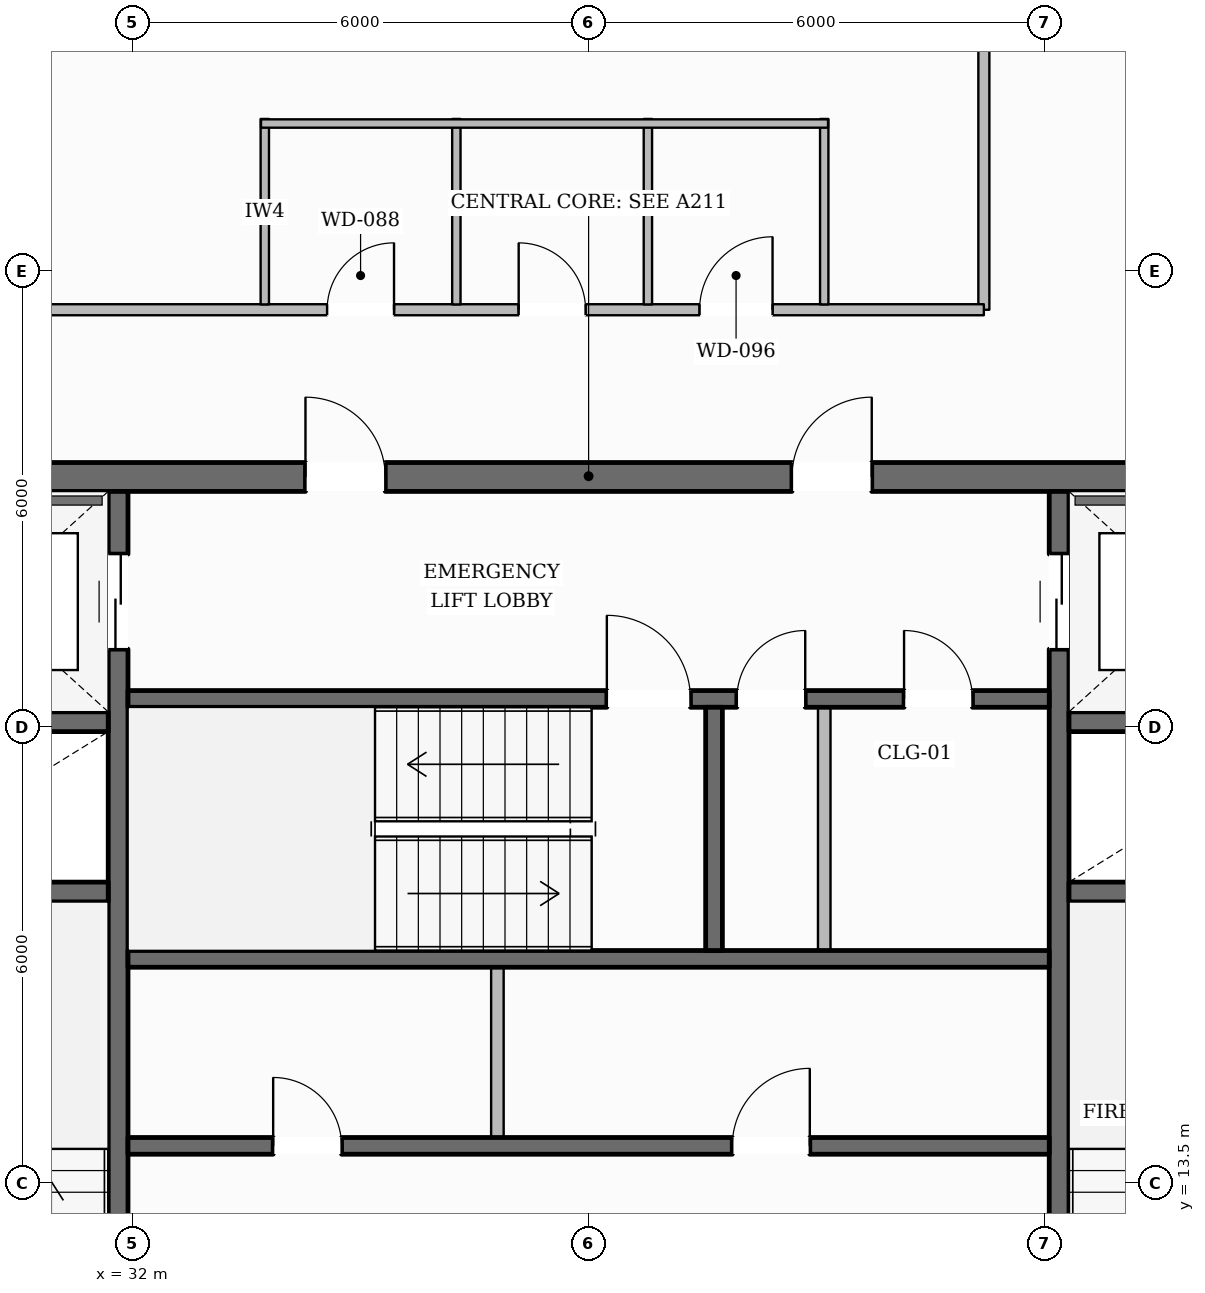
"""IFC4 building model, lengths in metres.
Left out: names, types, materials, properties, quantities, classifications, styles, units other than length and angle.
Written with IfcOpenShell. Run it as: python <this file> out.ifc"""

import sys

from ifc_helpers import new_model, si_unit, direction, frame, frame_2d, origin, place, context, subcontext, project, spatial, rectangle, extrude, element, fill, save


model = new_model("IFC4")
c1 = context("Model", 3, precision=1e-05, world=origin(), true_north=direction((0.0, 1.0)))
c2 = subcontext(c1, "Body", "Model", "MODEL_VIEW")
j1 = project(units=[si_unit("LENGTHUNIT", "METRE"), si_unit("PLANEANGLEUNIT", "RADIAN")], contexts=[c1])
p1 = place(None, origin())
s1 = spatial("IfcSite", under=j1, at=p1, CompositionType="ELEMENT")
p2 = place(p1, origin())
s2 = spatial("IfcBuilding", under=s1, at=p2, CompositionType="ELEMENT")
p3 = place(p2, frame((0.0, 0.0, 239.5)))
s3 = spatial("IfcBuildingStorey", under=s2, at=p3, CompositionType="ELEMENT", Elevation=239.5)
p4 = place(p3, frame((28.1, 22.79, 0.0), z_axis=(0.0, 0.0, 1.0), x_axis=(1.0, 0.0, 0.0)))
e1 = element("IfcWall", 1, at=p4, inside=s3, PredefinedType="SOLIDWALL", context=c2, shape_type="SweptSolid", body=[
    extrude(rectangle(XDim=19.8, YDim=0.38, at=frame_2d((9.9, 0.0))), origin(), (0.0, 0.0, 1.0), 3.61),
])
p5 = place(p4, frame((6.175, 0.0, 0.0)))
e2 = element("IfcOpeningElement", 2, at=p5, cuts=e1, PredefinedType="OPENING", context=c2, shape_type="SweptSolid", body=[
    extrude(rectangle(XDim=1.05, YDim=2.15, at=frame_2d((0.525, 1.075))), frame((0.0, 0.2, 0.0), z_axis=(0.0, -1.0, 0.0), x_axis=(1.0, 0.0, 0.0)), (0.0, 0.0, 1.0), 0.4),
])
p6 = place(p4, frame((12.575, 0.0, 0.0)))
e3 = element("IfcOpeningElement", 3, at=p6, cuts=e1, PredefinedType="OPENING", context=c2, shape_type="SweptSolid", body=[
    extrude(rectangle(XDim=1.05, YDim=2.15, at=frame_2d((0.525, 1.075))), frame((0.0, 0.2, 0.0), z_axis=(0.0, -1.0, 0.0), x_axis=(1.0, 0.0, 0.0)), (0.0, 0.0, 1.0), 0.4),
])
p7 = place(p3, frame((31.81, 9.6, 0.0), z_axis=(0.0, 0.0, 1.0), x_axis=(0.0, 1.0, 0.0)))
e4 = element("IfcWall", 4, at=p7, inside=s3, PredefinedType="SHEAR", context=c2, shape_type="SweptSolid", body=[
    extrude(rectangle(XDim=13.0, YDim=0.26, at=frame_2d((6.5, 0.0))), origin(), (0.0, 0.0, 1.0), 3.61),
])
p8 = place(p7, frame((10.925, 0.0, 0.0)))
e5 = element("IfcOpeningElement", 5, at=p8, cuts=e4, PredefinedType="OPENING", context=c2, shape_type="SweptSolid", body=[
    extrude(rectangle(XDim=1.25, YDim=2.25, at=frame_2d((0.625, 1.125))), frame((0.0, 0.14, 0.0), z_axis=(0.0, -1.0, 0.0), x_axis=(1.0, 0.0, 0.0)), (0.0, 0.0, 1.0), 0.28),
])
p9 = place(p3, frame((44.19, 9.6, 0.0), z_axis=(0.0, 0.0, 1.0), x_axis=(0.0, 1.0, 0.0)))
e6 = element("IfcWall", 6, at=p9, inside=s3, PredefinedType="SHEAR", context=c2, shape_type="SweptSolid", body=[
    extrude(rectangle(XDim=13.0, YDim=0.26, at=frame_2d((6.5, 0.0))), origin(), (0.0, 0.0, 1.0), 3.61),
])
p10 = place(p9, frame((10.925, 0.0, 0.0)))
e7 = element("IfcOpeningElement", 7, at=p10, cuts=e6, PredefinedType="OPENING", context=c2, shape_type="SweptSolid", body=[
    extrude(rectangle(XDim=1.25, YDim=2.25, at=frame_2d((0.625, 1.125))), frame((0.0, 0.14, 0.0), z_axis=(0.0, -1.0, 0.0), x_axis=(1.0, 0.0, 0.0)), (0.0, 0.0, 1.0), 0.28),
])
for number, where, z_axis, x_axis in (
    (8, (28.48, 17.33, 0.0), (0.0, 0.0, 1.0), (1.0, 0.0, 0.0)),
    (9, (28.48, 19.57, 0.0), (0.0, 0.0, 1.0), (1.0, 0.0, 0.0)),
    (10, (44.32, 17.33, 0.0), (0.0, 0.0, 1.0), (1.0, 0.0, 0.0)),
    (11, (44.32, 19.57, 0.0), (0.0, 0.0, 1.0), (1.0, 0.0, 0.0)),
):
    element("IfcWall", number, at=place(p3, frame(where, z_axis=z_axis, x_axis=x_axis)), inside=s3, PredefinedType="SHEAR", context=c2, shape_type="SweptSolid", body=[
        extrude(rectangle(XDim=3.2, YDim=0.26, at=frame_2d((1.6, 0.0))), origin(), (0.0, 0.0, 1.0), 3.61),
    ])
p11 = place(p3, frame((31.94, 19.87, 0.0), z_axis=(0.0, 0.0, 1.0), x_axis=(1.0, 0.0, 0.0)))
e12 = element("IfcWall", 12, at=p11, inside=s3, PredefinedType="SOLIDWALL", context=c2, shape_type="SweptSolid", body=[
    extrude(rectangle(XDim=12.12, YDim=0.22, at=frame_2d((6.06, 0.0))), origin(), (0.0, 0.0, 1.0), 3.61),
])
p12 = place(p11, frame((6.3, 0.0, 0.0)))
e13 = element("IfcOpeningElement", 13, at=p12, cuts=e12, PredefinedType="OPENING", context=c2, shape_type="SweptSolid", body=[
    extrude(rectangle(XDim=1.1, YDim=2.15, at=frame_2d((0.55, 1.075))), frame((0.0, 0.12, 0.0), z_axis=(0.0, -1.0, 0.0), x_axis=(1.0, 0.0, 0.0)), (0.0, 0.0, 1.0), 0.24),
])
p13 = place(p11, frame((8.01, 0.0, 0.0)))
e14 = element("IfcOpeningElement", 14, at=p13, cuts=e12, PredefinedType="OPENING", context=c2, shape_type="SweptSolid", body=[
    extrude(rectangle(XDim=0.9, YDim=2.1, at=frame_2d((0.45, 1.05))), frame((0.0, 0.12, 0.0), z_axis=(0.0, -1.0, 0.0), x_axis=(1.0, 0.0, 0.0)), (0.0, 0.0, 1.0), 0.24),
])
p14 = place(p11, frame((10.21, 0.0, 0.0)))
e15 = element("IfcOpeningElement", 15, at=p14, cuts=e12, PredefinedType="OPENING", context=c2, shape_type="SweptSolid", body=[
    extrude(rectangle(XDim=0.9, YDim=2.1, at=frame_2d((0.45, 1.05))), frame((0.0, 0.12, 0.0), z_axis=(0.0, -1.0, 0.0), x_axis=(1.0, 0.0, 0.0)), (0.0, 0.0, 1.0), 0.24),
])
p15 = place(p3, frame((31.94, 16.45, 0.0), z_axis=(0.0, 0.0, 1.0), x_axis=(1.0, 0.0, 0.0)))
e16 = element("IfcWall", 16, at=p15, inside=s3, PredefinedType="SOLIDWALL", context=c2, shape_type="SweptSolid", body=[
    extrude(rectangle(XDim=12.12, YDim=0.22, at=frame_2d((6.06, 0.0))), origin(), (0.0, 0.0, 1.0), 3.61),
])
p16 = place(p3, frame((39.65, 16.56, 0.0), z_axis=(0.0, 0.0, 1.0), x_axis=(0.0, 1.0, 0.0)))
e17 = element("IfcWall", 17, at=p16, inside=s3, PredefinedType="SOLIDWALL", context=c2, shape_type="SweptSolid", body=[
    extrude(rectangle(XDim=3.2, YDim=0.22, at=frame_2d((1.6, 0.0))), origin(), (0.0, 0.0, 1.0), 3.61),
])
p17 = place(p3, frame((31.94, 13.99, 0.0), z_axis=(0.0, 0.0, 1.0), x_axis=(1.0, 0.0, 0.0)))
e18 = element("IfcWall", 18, at=p17, inside=s3, PredefinedType="SOLIDWALL", context=c2, shape_type="SweptSolid", body=[
    extrude(rectangle(XDim=12.12, YDim=0.22, at=frame_2d((6.06, 0.0))), origin(), (0.0, 0.0, 1.0), 3.61),
])
p18 = place(p17, frame((1.91, 0.0, 0.0)))
e19 = element("IfcOpeningElement", 19, at=p18, cuts=e18, PredefinedType="OPENING", context=c2, shape_type="SweptSolid", body=[
    extrude(rectangle(XDim=0.9, YDim=2.1, at=frame_2d((0.45, 1.05))), frame((0.0, 0.12, 0.0), z_axis=(0.0, -1.0, 0.0), x_axis=(1.0, 0.0, 0.0)), (0.0, 0.0, 1.0), 0.24),
])
p19 = place(p17, frame((7.95, 0.0, 0.0)))
e20 = element("IfcOpeningElement", 20, at=p19, cuts=e18, PredefinedType="OPENING", context=c2, shape_type="SweptSolid", body=[
    extrude(rectangle(XDim=1.02, YDim=2.15, at=frame_2d((0.51, 1.075))), frame((0.0, 0.12, 0.0), z_axis=(0.0, -1.0, 0.0), x_axis=(1.0, 0.0, 0.0)), (0.0, 0.0, 1.0), 0.24),
])
p20 = place(p3, frame((16.196, 11.427, 0.0), z_axis=(0.0, 0.0, 1.0), x_axis=(0.490622807514, 0.871372056442, 0.0)))
e21 = element("IfcWall", 21, at=p20, inside=s3, PredefinedType="STANDARD", context=c2, shape_type="SweptSolid", body=[
    extrude(rectangle(XDim=37.632, YDim=0.35, at=frame_2d((18.816, 0.0))), origin(), (0.0, 0.0, 1.0), 3.196),
])
p21 = place(p20, frame((27.624, 0.0, 0.0)))
e22 = element("IfcOpeningElement", 22, at=p21, cuts=e21, PredefinedType="OPENING", context=c2, shape_type="SweptSolid", body=[
    extrude(rectangle(XDim=1.0, YDim=2.2, at=frame_2d((0.5, 1.1))), frame((0.0, 0.185, 0.0), z_axis=(0.0, -1.0, 0.0), x_axis=(1.0, 0.0, 0.0)), (0.0, 0.0, 1.0), 0.37),
])
p22 = place(p20, frame((33.418, 0.0, 0.65)))
e23 = element("IfcOpeningElement", 23, at=p22, cuts=e21, PredefinedType="OPENING", context=c2, shape_type="SweptSolid", body=[
    extrude(rectangle(XDim=1.35, YDim=1.75, at=frame_2d((0.675, 0.875))), frame((0.0, 0.185, 0.0), z_axis=(0.0, -1.0, 0.0), x_axis=(1.0, 0.0, 0.0)), (0.0, 0.0, 1.0), 0.37),
])
p23 = place(p20, frame((21.192, 0.0, 0.65)))
e24 = element("IfcOpeningElement", 24, at=p23, cuts=e21, PredefinedType="OPENING", context=c2, shape_type="SweptSolid", body=[
    extrude(rectangle(XDim=1.35, YDim=1.75, at=frame_2d((0.675, 0.875))), frame((0.0, 0.185, 0.0), z_axis=(0.0, -1.0, 0.0), x_axis=(1.0, 0.0, 0.0)), (0.0, 0.0, 1.0), 0.37),
])
p24 = place(p20, frame((8.966, 0.0, 0.65)))
e25 = element("IfcOpeningElement", 25, at=p24, cuts=e21, PredefinedType="OPENING", context=c2, shape_type="SweptSolid", body=[
    extrude(rectangle(XDim=1.35, YDim=1.75, at=frame_2d((0.675, 0.875))), frame((0.0, 0.185, 0.0), z_axis=(0.0, -1.0, 0.0), x_axis=(1.0, 0.0, 0.0)), (0.0, 0.0, 1.0), 0.37),
])
p25 = place(p20, frame((2.853, 0.0, 0.65)))
e26 = element("IfcOpeningElement", 26, at=p25, cuts=e21, PredefinedType="OPENING", context=c2, shape_type="SweptSolid", body=[
    extrude(rectangle(XDim=1.35, YDim=1.75, at=frame_2d((0.675, 0.875))), frame((0.0, 0.185, 0.0), z_axis=(0.0, -1.0, 0.0), x_axis=(1.0, 0.0, 0.0)), (0.0, 0.0, 1.0), 0.37),
])
p26 = place(p3, frame((41.394, 44.187, 0.0), z_axis=(0.0, 0.0, 1.0), x_axis=(0.494287620829, -0.869298422807, 0.0)))
e27 = element("IfcWall", 27, at=p26, inside=s3, PredefinedType="STANDARD", context=c2, shape_type="SweptSolid", body=[
    extrude(rectangle(XDim=37.899, YDim=0.35, at=frame_2d((18.95, 0.0))), origin(), (0.0, 0.0, 1.0), 3.196),
])
p27 = place(p26, frame((33.674, 0.0, 0.65)))
e28 = element("IfcOpeningElement", 28, at=p27, cuts=e27, PredefinedType="OPENING", context=c2, shape_type="SweptSolid", body=[
    extrude(rectangle(XDim=1.35, YDim=1.75, at=frame_2d((0.675, 0.875))), frame((0.0, 0.185, 0.0), z_axis=(0.0, -1.0, 0.0), x_axis=(1.0, 0.0, 0.0)), (0.0, 0.0, 1.0), 0.37),
])
p28 = place(p26, frame((27.515, 0.0, 0.65)))
e29 = element("IfcOpeningElement", 29, at=p28, cuts=e27, PredefinedType="OPENING", context=c2, shape_type="SweptSolid", body=[
    extrude(rectangle(XDim=1.35, YDim=1.75, at=frame_2d((0.675, 0.875))), frame((0.0, 0.185, 0.0), z_axis=(0.0, -1.0, 0.0), x_axis=(1.0, 0.0, 0.0)), (0.0, 0.0, 1.0), 0.37),
])
p29 = place(p26, frame((21.357, 0.0, 0.65)))
e30 = element("IfcOpeningElement", 30, at=p29, cuts=e27, PredefinedType="OPENING", context=c2, shape_type="SweptSolid", body=[
    extrude(rectangle(XDim=1.35, YDim=1.75, at=frame_2d((0.675, 0.875))), frame((0.0, 0.185, 0.0), z_axis=(0.0, -1.0, 0.0), x_axis=(1.0, 0.0, 0.0)), (0.0, 0.0, 1.0), 0.37),
])
p30 = place(p26, frame((9.04, 0.0, 0.65)))
e31 = element("IfcOpeningElement", 31, at=p30, cuts=e27, PredefinedType="OPENING", context=c2, shape_type="SweptSolid", body=[
    extrude(rectangle(XDim=1.35, YDim=1.75, at=frame_2d((0.675, 0.875))), frame((0.0, 0.185, 0.0), z_axis=(0.0, -1.0, 0.0), x_axis=(1.0, 0.0, 0.0)), (0.0, 0.0, 1.0), 0.37),
])
p31 = place(p26, frame((2.882, 0.0, 0.65)))
e32 = element("IfcOpeningElement", 32, at=p31, cuts=e27, PredefinedType="OPENING", context=c2, shape_type="SweptSolid", body=[
    extrude(rectangle(XDim=1.35, YDim=1.75, at=frame_2d((0.675, 0.875))), frame((0.0, 0.185, 0.0), z_axis=(0.0, -1.0, 0.0), x_axis=(1.0, 0.0, 0.0)), (0.0, 0.0, 1.0), 0.37),
])
p32 = place(p3, frame((36.8, 14.1, 0.0), z_axis=(0.0, 0.0, 1.0), x_axis=(0.0, 1.0, 0.0)))
e33 = element("IfcWall", 33, at=p32, inside=s3, PredefinedType="PARTITIONING", context=c2, shape_type="SweptSolid", body=[
    extrude(rectangle(XDim=2.24, YDim=0.165, at=frame_2d((1.12, 0.0))), origin(), (0.0, 0.0, 1.0), 3.61),
])
p33 = place(p3, frame((41.1, 16.56, 0.0), z_axis=(0.0, 0.0, 1.0), x_axis=(0.0, 1.0, 0.0)))
e34 = element("IfcWall", 34, at=p33, inside=s3, PredefinedType="PARTITIONING", context=c2, shape_type="SweptSolid", body=[
    extrude(rectangle(XDim=3.2, YDim=0.165, at=frame_2d((1.6, 0.0))), origin(), (0.0, 0.0, 1.0), 3.61),
])
p34 = place(p3, frame((43.2, 24.99, 0.0), z_axis=(0.0, 0.0, 1.0), x_axis=(0.0, 1.0, 0.0)))
e35 = element("IfcWall", 35, at=p34, inside=s3, PredefinedType="PARTITIONING", context=c2, shape_type="SweptSolid", body=[
    extrude(rectangle(XDim=9.41, YDim=0.145, at=frame_2d((4.705, 0.0))), origin(), (0.0, 0.0, 1.0), 3.61),
])
p35 = place(p34, frame((4.005, 0.0, 0.0)))
e36 = element("IfcOpeningElement", 36, at=p35, cuts=e35, PredefinedType="OPENING", context=c2, shape_type="SweptSolid", body=[
    extrude(rectangle(XDim=1.4, YDim=2.2, at=frame_2d((0.7, 1.1))), frame((0.0, 0.083, 0.0), z_axis=(0.0, -1.0, 0.0), x_axis=(1.0, 0.0, 0.0)), (0.0, 0.0, 1.0), 0.165),
])
p36 = place(p3, frame((26.09, 24.99, 0.0), z_axis=(0.0, 0.0, 1.0), x_axis=(1.0, 0.0, 0.0)))
e37 = element("IfcWall", 37, at=p36, inside=s3, PredefinedType="PARTITIONING", context=c2, shape_type="SweptSolid", body=[
    extrude(rectangle(XDim=17.11, YDim=0.145, at=frame_2d((8.555, 0.0))), origin(), (0.0, 0.0, 1.0), 3.61),
])
p37 = place(p36, frame((8.47, 0.0, 0.0)))
e38 = element("IfcOpeningElement", 38, at=p37, cuts=e37, PredefinedType="OPENING", context=c2, shape_type="SweptSolid", body=[
    extrude(rectangle(XDim=0.88, YDim=2.1, at=frame_2d((0.44, 1.05))), frame((0.0, 0.083, 0.0), z_axis=(0.0, -1.0, 0.0), x_axis=(1.0, 0.0, 0.0)), (0.0, 0.0, 1.0), 0.165),
])
p38 = place(p36, frame((10.99, 0.0, 0.0)))
e39 = element("IfcOpeningElement", 39, at=p38, cuts=e37, PredefinedType="OPENING", context=c2, shape_type="SweptSolid", body=[
    extrude(rectangle(XDim=0.88, YDim=2.1, at=frame_2d((0.44, 1.05))), frame((0.0, 0.083, 0.0), z_axis=(0.0, -1.0, 0.0), x_axis=(1.0, 0.0, 0.0)), (0.0, 0.0, 1.0), 0.165),
])
p39 = place(p36, frame((13.37, 0.0, 0.0)))
e40 = element("IfcOpeningElement", 40, at=p39, cuts=e37, PredefinedType="OPENING", context=c2, shape_type="SweptSolid", body=[
    extrude(rectangle(XDim=0.96, YDim=2.1, at=frame_2d((0.48, 1.05))), frame((0.0, 0.083, 0.0), z_axis=(0.0, -1.0, 0.0), x_axis=(1.0, 0.0, 0.0)), (0.0, 0.0, 1.0), 0.165),
])
for number, where, z_axis, x_axis in (
    (41, (33.74, 25.06, 0.0), (0.0, 0.0, 1.0), (0.0, 1.0, 0.0)),
    (42, (36.26, 25.06, 0.0), (0.0, 0.0, 1.0), (0.0, 1.0, 0.0)),
    (43, (38.78, 25.06, 0.0), (0.0, 0.0, 1.0), (0.0, 1.0, 0.0)),
    (44, (41.1, 25.06, 0.0), (0.0, 0.0, 1.0), (0.0, 1.0, 0.0)),
):
    element("IfcWall", number, at=place(p3, frame(where, z_axis=z_axis, x_axis=x_axis)), inside=s3, PredefinedType="PLUMBINGWALL", context=c2, shape_type="SweptSolid", body=[
        extrude(rectangle(XDim=2.44, YDim=0.11, at=frame_2d((1.22, 0.0))), origin(), (0.0, 0.0, 1.0), 3.61),
    ])
p40 = place(p3, frame((33.69, 27.44, 0.0), z_axis=(0.0, 0.0, 1.0), x_axis=(1.0, 0.0, 0.0)))
e45 = element("IfcWall", 45, at=p40, inside=s3, PredefinedType="PLUMBINGWALL", context=c2, shape_type="SweptSolid", body=[
    extrude(rectangle(XDim=7.46, YDim=0.11, at=frame_2d((3.73, 0.0))), origin(), (0.0, 0.0, 1.0), 3.61),
])
p41 = place(p12, origin())
e46 = element("IfcDoor", 46, at=p41, inside=s3, OperationType="SINGLE_SWING_LEFT", PredefinedType="DOOR", context=c2, shape_type="SweptSolid", body=[
    extrude(rectangle(XDim=1.1, YDim=2.15, at=frame_2d((0.55, 1.075))), frame((0.0, 0.025, 0.0), z_axis=(0.0, -1.0, 0.0), x_axis=(1.0, 0.0, 0.0)), (0.0, 0.0, 1.0), 0.05),
])
fill(e13, e46)
p42 = place(p5, origin())
e47 = element("IfcDoor", 47, at=p42, inside=s3, OperationType="SINGLE_SWING_LEFT", PredefinedType="DOOR", context=c2, shape_type="SweptSolid", body=[
    extrude(rectangle(XDim=1.05, YDim=2.15, at=frame_2d((0.525, 1.075))), frame((0.0, 0.025, 0.0), z_axis=(0.0, -1.0, 0.0), x_axis=(1.0, 0.0, 0.0)), (0.0, 0.0, 1.0), 0.05),
])
fill(e2, e47)
p43 = place(p6, origin())
e48 = element("IfcDoor", 48, at=p43, inside=s3, OperationType="SINGLE_SWING_RIGHT", PredefinedType="DOOR", context=c2, shape_type="SweptSolid", body=[
    extrude(rectangle(XDim=1.05, YDim=2.15, at=frame_2d((0.525, 1.075))), frame((0.0, 0.025, 0.0), z_axis=(0.0, -1.0, 0.0), x_axis=(1.0, 0.0, 0.0)), (0.0, 0.0, 1.0), 0.05),
])
fill(e3, e48)
p44 = place(p8, origin())
e49 = element("IfcDoor", 49, at=p44, inside=s3, OperationType="DOUBLE_DOOR_SLIDING", PredefinedType="DOOR", context=c2, shape_type="SweptSolid", body=[
    extrude(rectangle(XDim=1.25, YDim=2.25, at=frame_2d((0.625, 1.125))), frame((0.0, 0.025, 0.0), z_axis=(0.0, -1.0, 0.0), x_axis=(1.0, 0.0, 0.0)), (0.0, 0.0, 1.0), 0.05),
])
fill(e5, e49)
p45 = place(p10, origin())
e50 = element("IfcDoor", 50, at=p45, inside=s3, OperationType="DOUBLE_DOOR_SLIDING", PredefinedType="DOOR", context=c2, shape_type="SweptSolid", body=[
    extrude(rectangle(XDim=1.25, YDim=2.25, at=frame_2d((0.625, 1.125))), frame((0.0, 0.025, 0.0), z_axis=(0.0, -1.0, 0.0), x_axis=(1.0, 0.0, 0.0)), (0.0, 0.0, 1.0), 0.05),
])
fill(e7, e50)
p46 = place(p18, origin())
e51 = element("IfcDoor", 51, at=p46, inside=s3, OperationType="SINGLE_SWING_LEFT", PredefinedType="DOOR", context=c2, shape_type="SweptSolid", body=[
    extrude(rectangle(XDim=0.9, YDim=2.1, at=frame_2d((0.45, 1.05))), frame((0.0, 0.025, 0.0), z_axis=(0.0, -1.0, 0.0), x_axis=(1.0, 0.0, 0.0)), (0.0, 0.0, 1.0), 0.05),
])
fill(e19, e51)
p47 = place(p19, origin())
e52 = element("IfcDoor", 52, at=p47, inside=s3, OperationType="SINGLE_SWING_RIGHT", PredefinedType="DOOR", context=c2, shape_type="SweptSolid", body=[
    extrude(rectangle(XDim=1.02, YDim=2.15, at=frame_2d((0.51, 1.075))), frame((0.0, 0.025, 0.0), z_axis=(0.0, -1.0, 0.0), x_axis=(1.0, 0.0, 0.0)), (0.0, 0.0, 1.0), 0.05),
])
fill(e20, e52)
p48 = place(p13, origin())
e53 = element("IfcDoor", 53, at=p48, inside=s3, OperationType="SINGLE_SWING_RIGHT", PredefinedType="DOOR", context=c2, shape_type="SweptSolid", body=[
    extrude(rectangle(XDim=0.9, YDim=2.1, at=frame_2d((0.45, 1.05))), frame((0.0, 0.025, 0.0), z_axis=(0.0, -1.0, 0.0), x_axis=(1.0, 0.0, 0.0)), (0.0, 0.0, 1.0), 0.05),
])
fill(e14, e53)
p49 = place(p14, origin())
e54 = element("IfcDoor", 54, at=p49, inside=s3, OperationType="SINGLE_SWING_LEFT", PredefinedType="DOOR", context=c2, shape_type="SweptSolid", body=[
    extrude(rectangle(XDim=0.9, YDim=2.1, at=frame_2d((0.45, 1.05))), frame((0.0, 0.025, 0.0), z_axis=(0.0, -1.0, 0.0), x_axis=(1.0, 0.0, 0.0)), (0.0, 0.0, 1.0), 0.05),
])
fill(e15, e54)
p50 = place(p37, origin())
e55 = element("IfcDoor", 55, at=p50, inside=s3, OperationType="SINGLE_SWING_RIGHT", PredefinedType="DOOR", context=c2, shape_type="SweptSolid", body=[
    extrude(rectangle(XDim=0.88, YDim=2.1, at=frame_2d((0.44, 1.05))), frame((0.0, 0.025, 0.0), z_axis=(0.0, -1.0, 0.0), x_axis=(1.0, 0.0, 0.0)), (0.0, 0.0, 1.0), 0.05),
])
fill(e38, e55)
p51 = place(p38, origin())
e56 = element("IfcDoor", 56, at=p51, inside=s3, OperationType="SINGLE_SWING_LEFT", PredefinedType="DOOR", context=c2, shape_type="SweptSolid", body=[
    extrude(rectangle(XDim=0.88, YDim=2.1, at=frame_2d((0.44, 1.05))), frame((0.0, 0.025, 0.0), z_axis=(0.0, -1.0, 0.0), x_axis=(1.0, 0.0, 0.0)), (0.0, 0.0, 1.0), 0.05),
])
fill(e39, e56)
p52 = place(p39, origin())
e57 = element("IfcDoor", 57, at=p52, inside=s3, OperationType="SINGLE_SWING_RIGHT", PredefinedType="DOOR", context=c2, shape_type="SweptSolid", body=[
    extrude(rectangle(XDim=0.96, YDim=2.1, at=frame_2d((0.48, 1.05))), frame((0.0, 0.025, 0.0), z_axis=(0.0, -1.0, 0.0), x_axis=(1.0, 0.0, 0.0)), (0.0, 0.0, 1.0), 0.05),
])
fill(e40, e57)
save(model, sys.argv[1])
